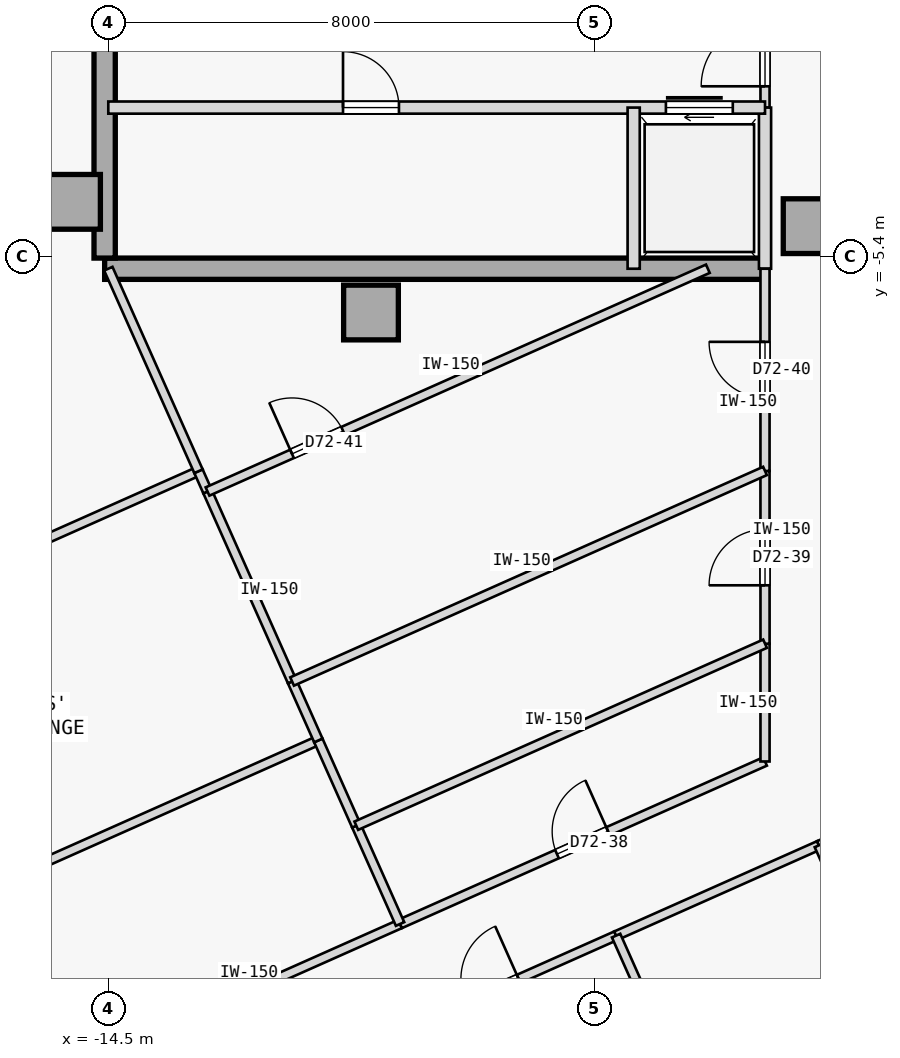
"""IFC4 building model, lengths in metres.
Left out: names, types, materials, properties, quantities, classifications, styles, units other than length and angle.
Written with IfcOpenShell. Run it as: python <this file> out.ifc"""

import sys

from ifc_helpers import new_model, si_unit, direction, frame, frame_2d, origin, origin_2d, place, context, subcontext, project, spatial, rectangle, extrude, element, fill, save


model = new_model("IFC4")
c1 = context("Model", 3, precision=1e-05, world=origin(), true_north=direction((0.0, 1.0)))
c2 = subcontext(c1, "Body", "Model", "MODEL_VIEW")
j1 = project(units=[si_unit("LENGTHUNIT", "METRE"), si_unit("PLANEANGLEUNIT", "RADIAN")], contexts=[c1])
p1 = place(None, origin())
s1 = spatial("IfcSite", under=j1, at=p1, CompositionType="ELEMENT")
p2 = place(p1, origin())
s2 = spatial("IfcBuilding", under=s1, at=p2, CompositionType="ELEMENT")
p3 = place(p2, frame((0.0, 0.0, 268.9)))
s3 = spatial("IfcBuildingStorey", under=s2, at=p3, CompositionType="ELEMENT", Elevation=268.9)
for number, where, z_axis, x_axis in (
    (1, (-15.08, -4.5, 0.0), (0.0, 0.0, 1.0), (1.0, 0.0, 0.0)),
    (2, (-10.18, -6.32, 0.0), (0.0, 0.0, 1.0), (1.0, 0.0, 0.0)),
    (3, (-2.95, -4.9, 0.0), (0.0, 0.0, 1.0), (1.0, 0.0, 0.0)),
):
    element("IfcColumn", number, at=place(p3, frame(where, z_axis=z_axis, x_axis=x_axis)), inside=s3, PredefinedType="COLUMN", context=c2, shape_type="SweptSolid", body=[
        extrude(rectangle(XDim=0.9, YDim=0.9, at=origin_2d()), origin(), (0.0, 0.0, 1.0), 3.35),
    ])
p4 = place(p3, frame((-14.56, -5.6, 0.0), z_axis=(0.0, 0.0, 1.0), x_axis=(1.0, 0.0, 0.0)))
e4 = element("IfcWall", 4, at=p4, inside=s3, PredefinedType="SHEAR", context=c2, shape_type="SweptSolid", body=[
    extrude(rectangle(XDim=10.86, YDim=0.35, at=frame_2d((5.43, 0.0))), origin(), (0.0, 0.0, 1.0), 3.125),
])
p5 = place(p3, frame((-14.56, -5.425, 0.0), z_axis=(0.0, 0.0, 1.0), x_axis=(0.0, 1.0, 0.0)))
e5 = element("IfcWall", 5, at=p5, inside=s3, PredefinedType="SHEAR", context=c2, shape_type="SweptSolid", body=[
    extrude(rectangle(XDim=10.85, YDim=0.35, at=frame_2d((5.425, 0.0))), origin(), (0.0, 0.0, 1.0), 3.125),
])
p6 = place(p3, frame((-3.7, -2.95, 0.0), z_axis=(0.0, 0.0, 1.0), x_axis=(0.0, 1.0, 0.0)))
e6 = element("IfcWall", 6, at=p6, inside=s3, PredefinedType="PARTITIONING", context=c2, shape_type="SweptSolid", body=[
    extrude(rectangle(XDim=1.8, YDim=0.15, at=frame_2d((0.9, 0.0))), origin(), (0.0, 0.0, 1.0), 3.125),
])
p7 = place(p6, frame((0.35, 0.0, 0.0)))
e7 = element("IfcOpeningElement", 7, at=p7, cuts=e6, PredefinedType="OPENING", context=c2, shape_type="SweptSolid", body=[
    extrude(rectangle(XDim=1.05, YDim=2.18, at=frame_2d((0.525, 1.09))), frame((0.0, 0.085, 0.0), z_axis=(0.0, -1.0, 0.0), x_axis=(1.0, 0.0, 0.0)), (0.0, 0.0, 1.0), 0.17),
])
p8 = place(p3, frame((-3.7, -5.6, 0.0), z_axis=(0.0, 0.0, 1.0), x_axis=(0.0, 1.0, 0.0)))
e8 = element("IfcWall", 8, at=p8, inside=s3, PredefinedType="STANDARD", context=c2, shape_type="SweptSolid", body=[
    extrude(rectangle(XDim=2.65, YDim=0.2, at=frame_2d((1.325, 0.0))), origin(), (0.0, 0.0, 1.0), 3.125),
])
p9 = place(p3, frame((-14.5, -2.95, 0.0), z_axis=(0.0, 0.0, 1.0), x_axis=(1.0, 0.0, 0.0)))
e9 = element("IfcWall", 9, at=p9, inside=s3, PredefinedType="STANDARD", context=c2, shape_type="SweptSolid", body=[
    extrude(rectangle(XDim=10.8, YDim=0.2, at=frame_2d((5.4, 0.0))), origin(), (0.0, 0.0, 1.0), 3.125),
])
p10 = place(p9, frame((9.17, 0.0, 0.0)))
e10 = element("IfcOpeningElement", 10, at=p10, cuts=e9, PredefinedType="OPENING", context=c2, shape_type="SweptSolid", body=[
    extrude(rectangle(XDim=1.1, YDim=2.15, at=frame_2d((0.55, 1.075))), frame((0.0, 0.11, 0.0), z_axis=(0.0, -1.0, 0.0), x_axis=(1.0, 0.0, 0.0)), (0.0, 0.0, 1.0), 0.22),
])
p11 = place(p9, frame((3.86, 0.0, 0.0)))
e11 = element("IfcOpeningElement", 11, at=p11, cuts=e9, PredefinedType="OPENING", context=c2, shape_type="SweptSolid", body=[
    extrude(rectangle(XDim=0.92, YDim=2.15, at=frame_2d((0.46, 1.075))), frame((0.0, 0.11, 0.0), z_axis=(0.0, -1.0, 0.0), x_axis=(1.0, 0.0, 0.0)), (0.0, 0.0, 1.0), 0.22),
])
p12 = place(p3, frame((-5.86, -5.6, 0.0), z_axis=(0.0, 0.0, 1.0), x_axis=(0.0, 1.0, 0.0)))
e12 = element("IfcWall", 12, at=p12, inside=s3, PredefinedType="STANDARD", context=c2, shape_type="SweptSolid", body=[
    extrude(rectangle(XDim=2.65, YDim=0.2, at=frame_2d((1.325, 0.0))), origin(), (0.0, 0.0, 1.0), 3.125),
])
p13 = place(p3, frame((-10.221, -18.38, 0.0), z_axis=(0.0, 0.0, 1.0), x_axis=(0.913542602601, 0.406743055543, 0.0)))
e13 = element("IfcWall", 13, at=p13, inside=s3, PredefinedType="PARTITIONING", context=c2, shape_type="SweptSolid", body=[
    extrude(rectangle(XDim=4.458, YDim=0.15, at=frame_2d((2.229, 0.0))), origin(), (0.0, 0.0, 1.0), 3.125),
])
p14 = place(p13, frame((1.754, 0.0, 0.0)))
e14 = element("IfcOpeningElement", 14, at=p14, cuts=e13, PredefinedType="OPENING", context=c2, shape_type="SweptSolid", body=[
    extrude(rectangle(XDim=0.95, YDim=2.15, at=frame_2d((0.475, 1.075))), frame((0.0, 0.085, 0.0), z_axis=(0.0, -1.0, 0.0), x_axis=(1.0, 0.0, 0.0)), (0.0, 0.0, 1.0), 0.17),
])
p15 = place(p3, frame((-6.149, -16.567, 0.0), z_axis=(0.0, 0.0, 1.0), x_axis=(0.913543802, 0.40674036169, 0.0)))
e15 = element("IfcWall", 15, at=p15, inside=s3, PredefinedType="PARTITIONING", context=c2, shape_type="SweptSolid", body=[
    extrude(rectangle(XDim=3.65, YDim=0.15, at=frame_2d((1.825, 0.0))), origin(), (0.0, 0.0, 1.0), 3.125),
])
p16 = place(p3, frame((-2.814, -15.082, 0.0), z_axis=(0.0, 0.0, 1.0), x_axis=(0.913558622212, 0.406707073682, 0.0)))
e16 = element("IfcWall", 16, at=p16, inside=s3, PredefinedType="PARTITIONING", context=c2, shape_type="SweptSolid", body=[
    extrude(rectangle(XDim=2.35, YDim=0.15, at=frame_2d((1.175, 0.0))), origin(), (0.0, 0.0, 1.0), 3.125),
])
p17 = place(p3, frame((-20.445, -21.159, 0.0), z_axis=(0.0, 0.0, 1.0), x_axis=(0.913547681516, 0.406731648137, 0.0)))
e17 = element("IfcWall", 17, at=p17, inside=s3, PredefinedType="PARTITIONING", context=c2, shape_type="SweptSolid", body=[
    extrude(rectangle(XDim=11.76, YDim=0.15, at=frame_2d((5.88, 0.0))), origin(), (0.0, 0.0, 1.0), 3.125),
])
p18 = place(p17, frame((5.42, 0.0, 0.0)))
e18 = element("IfcOpeningElement", 18, at=p18, cuts=e17, PredefinedType="OPENING", context=c2, shape_type="SweptSolid", body=[
    extrude(rectangle(XDim=0.92, YDim=2.15, at=frame_2d((0.46, 1.075))), frame((0.0, 0.085, 0.0), z_axis=(0.0, -1.0, 0.0), x_axis=(1.0, 0.0, 0.0)), (0.0, 0.0, 1.0), 0.17),
])
p19 = place(p3, frame((-9.702, -16.375, 0.0), z_axis=(0.0, 0.0, 1.0), x_axis=(0.913552389019, 0.406721074594, 0.0)))
e19 = element("IfcWall", 19, at=p19, inside=s3, PredefinedType="PARTITIONING", context=c2, shape_type="SweptSolid", body=[
    extrude(rectangle(XDim=6.57, YDim=0.15, at=frame_2d((3.285, 0.0))), origin(), (0.0, 0.0, 1.0), 3.125),
])
p20 = place(p19, frame((2.825, 0.0, 0.0)))
e20 = element("IfcOpeningElement", 20, at=p20, cuts=e19, PredefinedType="OPENING", context=c2, shape_type="SweptSolid", body=[
    extrude(rectangle(XDim=0.92, YDim=2.15, at=frame_2d((0.46, 1.075))), frame((0.0, 0.085, 0.0), z_axis=(0.0, -1.0, 0.0), x_axis=(1.0, 0.0, 0.0)), (0.0, 0.0, 1.0), 0.17),
])
p21 = place(p3, frame((-3.7, -13.703, 0.0), z_axis=(0.0, 0.0, 1.0), x_axis=(0.000126055716, 0.999999992055, 0.0)))
e21 = element("IfcWall", 21, at=p21, inside=s3, PredefinedType="PARTITIONING", context=c2, shape_type="SweptSolid", body=[
    extrude(rectangle(XDim=1.937, YDim=0.15, at=frame_2d((0.968, 0.0))), origin(), (0.0, 0.0, 1.0), 3.125),
])
p22 = place(p3, frame((-3.7, -11.767, 0.0), z_axis=(0.0, 0.0, 1.0), x_axis=(-0.000171850831, 0.999999985234, 0.0)))
e22 = element("IfcWall", 22, at=p22, inside=s3, PredefinedType="PARTITIONING", context=c2, shape_type="SweptSolid", body=[
    extrude(rectangle(XDim=2.841, YDim=0.15, at=frame_2d((1.421, 0.0))), origin(), (0.0, 0.0, 1.0), 3.125),
])
p23 = place(p22, frame((0.961, 0.0, 0.0)))
e23 = element("IfcOpeningElement", 23, at=p23, cuts=e22, PredefinedType="OPENING", context=c2, shape_type="SweptSolid", body=[
    extrude(rectangle(XDim=0.92, YDim=2.15, at=frame_2d((0.46, 1.075))), frame((0.0, 0.085, 0.0), z_axis=(0.0, -1.0, 0.0), x_axis=(1.0, 0.0, 0.0)), (0.0, 0.0, 1.0), 0.17),
])
p24 = place(p3, frame((-3.7, -8.925, 0.0), z_axis=(0.0, 0.0, 1.0), x_axis=(7.3410659e-05, 0.999999997305, 0.0)))
e24 = element("IfcWall", 24, at=p24, inside=s3, PredefinedType="PARTITIONING", context=c2, shape_type="SweptSolid", body=[
    extrude(rectangle(XDim=3.326, YDim=0.15, at=frame_2d((1.663, 0.0))), origin(), (0.0, 0.0, 1.0), 3.125),
])
p25 = place(p24, frame((1.203, 0.0, 0.0)))
e25 = element("IfcOpeningElement", 25, at=p25, cuts=e24, PredefinedType="OPENING", context=c2, shape_type="SweptSolid", body=[
    extrude(rectangle(XDim=0.92, YDim=2.15, at=frame_2d((0.46, 1.075))), frame((0.0, 0.085, 0.0), z_axis=(0.0, -1.0, 0.0), x_axis=(1.0, 0.0, 0.0)), (0.0, 0.0, 1.0), 0.17),
])
p26 = place(p3, frame((-2.271, -25.278, 0.0), z_axis=(0.0, 0.0, 1.0), x_axis=(-0.406751296215, 0.913538933504, 0.0)))
e26 = element("IfcWall", 26, at=p26, inside=s3, PredefinedType="PARTITIONING", context=c2, shape_type="SweptSolid", body=[
    extrude(rectangle(XDim=9.535, YDim=0.15, at=frame_2d((4.768, 0.0))), origin(), (0.0, 0.0, 1.0), 3.125),
])
p27 = place(p3, frame((-1.92, -17.092, 0.0), z_axis=(0.0, 0.0, 1.0), x_axis=(-0.406725294076, 0.913550510459, 0.0)))
e27 = element("IfcWall", 27, at=p27, inside=s3, PredefinedType="PARTITIONING", context=c2, shape_type="SweptSolid", body=[
    extrude(rectangle(XDim=2.2, YDim=0.15, at=frame_2d((1.1, 0.0))), origin(), (0.0, 0.0, 1.0), 3.125),
])
p28 = place(p3, frame((-21.789, -18.14, 0.0), z_axis=(0.0, 0.0, 1.0), x_axis=(0.913544247064, 0.406739362069, 0.0)))
e28 = element("IfcWall", 28, at=p28, inside=s3, PredefinedType="PARTITIONING", context=c2, shape_type="SweptSolid", body=[
    extrude(rectangle(XDim=11.76, YDim=0.15, at=frame_2d((5.88, 0.0))), origin(), (0.0, 0.0, 1.0), 3.125),
])
p29 = place(p3, frame((-9.702, -16.375, 0.0), z_axis=(0.0, 0.0, 1.0), x_axis=(-0.406740252054, 0.913543850813, 0.0)))
e29 = element("IfcWall", 29, at=p29, inside=s3, PredefinedType="PARTITIONING", context=c2, shape_type="SweptSolid", body=[
    extrude(rectangle(XDim=1.769, YDim=0.15, at=frame_2d((0.884, 0.0))), origin(), (0.0, 0.0, 1.0), 3.125),
])
p30 = place(p3, frame((-10.421, -14.76, 0.0), z_axis=(0.0, 0.0, 1.0), x_axis=(-0.406817131294, 0.91350961773, 0.0)))
e30 = element("IfcWall", 30, at=p30, inside=s3, PredefinedType="PARTITIONING", context=c2, shape_type="SweptSolid", body=[
    extrude(rectangle(XDim=1.535, YDim=0.15, at=frame_2d((0.768, 0.0))), origin(), (0.0, 0.0, 1.0), 3.125),
])
p31 = place(p3, frame((-21.942, -12.904, 0.0), z_axis=(0.0, 0.0, 1.0), x_axis=(0.913542396088, 0.40674351937, 0.0)))
e31 = element("IfcWall", 31, at=p31, inside=s3, PredefinedType="PARTITIONING", context=c2, shape_type="SweptSolid", body=[
    extrude(rectangle(XDim=9.77, YDim=0.15, at=frame_2d((4.885, 0.0))), origin(), (0.0, 0.0, 1.0), 3.125),
])
p32 = place(p3, frame((-11.046, -13.357, 0.0), z_axis=(0.0, 0.0, 1.0), x_axis=(-0.406629497236, 0.913593154515, 0.0)))
e32 = element("IfcWall", 32, at=p32, inside=s3, PredefinedType="PARTITIONING", context=c2, shape_type="SweptSolid", body=[
    extrude(rectangle(XDim=1.061, YDim=0.15, at=frame_2d((0.53, 0.0))), origin(), (0.0, 0.0, 1.0), 3.125),
])
p33 = place(p3, frame((-11.477, -12.388, 0.0), z_axis=(0.0, 0.0, 1.0), x_axis=(-0.406760980894, 0.913534621359, 0.0)))
e33 = element("IfcWall", 33, at=p33, inside=s3, PredefinedType="PARTITIONING", context=c2, shape_type="SweptSolid", body=[
    extrude(rectangle(XDim=3.42, YDim=0.15, at=frame_2d((1.71, 0.0))), origin(), (0.0, 0.0, 1.0), 3.125),
])
p34 = place(p3, frame((-12.868, -9.264, 0.0), z_axis=(0.0, 0.0, 1.0), x_axis=(-0.406634840409, 0.913590776314, 0.0)))
e34 = element("IfcWall", 34, at=p34, inside=s3, PredefinedType="PARTITIONING", context=c2, shape_type="SweptSolid", body=[
    extrude(rectangle(XDim=0.365, YDim=0.15, at=frame_2d((0.183, 0.0))), origin(), (0.0, 0.0, 1.0), 3.125),
])
p35 = place(p3, frame((-13.017, -8.93, 0.0), z_axis=(0.0, 0.0, 1.0), x_axis=(-0.406722395322, 0.913551801018, 0.0)))
e35 = element("IfcWall", 35, at=p35, inside=s3, PredefinedType="PARTITIONING", context=c2, shape_type="SweptSolid", body=[
    extrude(rectangle(XDim=3.646, YDim=0.15, at=frame_2d((1.823, 0.0))), origin(), (0.0, 0.0, 1.0), 3.125),
])
p36 = place(p3, frame((-10.421, -14.76, 0.0), z_axis=(0.0, 0.0, 1.0), x_axis=(0.913533574053, 0.406763333006, 0.0)))
e36 = element("IfcWall", 36, at=p36, inside=s3, PredefinedType="PARTITIONING", context=c2, shape_type="SweptSolid", body=[
    extrude(rectangle(XDim=7.358, YDim=0.15, at=frame_2d((3.679, 0.0))), origin(), (0.0, 0.0, 1.0), 3.125),
])
p37 = place(p3, frame((-11.477, -12.388, 0.0), z_axis=(0.0, 0.0, 1.0), x_axis=(0.913542897736, 0.406742392673, 0.0)))
e37 = element("IfcWall", 37, at=p37, inside=s3, PredefinedType="PARTITIONING", context=c2, shape_type="SweptSolid", body=[
    extrude(rectangle(XDim=8.513, YDim=0.15, at=frame_2d((4.257, 0.0))), origin(), (0.0, 0.0, 1.0), 3.125),
])
p38 = place(p3, frame((-12.868, -9.264, 0.0), z_axis=(0.0, 0.0, 1.0), x_axis=(0.913545332854, 0.406736923356, 0.0)))
e38 = element("IfcWall", 38, at=p38, inside=s3, PredefinedType="PARTITIONING", context=c2, shape_type="SweptSolid", body=[
    extrude(rectangle(XDim=9.007, YDim=0.15, at=frame_2d((4.504, 0.0))), origin(), (0.0, 0.0, 1.0), 3.125),
])
p39 = place(p38, frame((1.521, 0.0, 0.0)))
e39 = element("IfcOpeningElement", 39, at=p39, cuts=e38, PredefinedType="OPENING", context=c2, shape_type="SweptSolid", body=[
    extrude(rectangle(XDim=0.92, YDim=2.15, at=frame_2d((0.46, 1.075))), frame((0.0, 0.085, 0.0), z_axis=(0.0, -1.0, 0.0), x_axis=(1.0, 0.0, 0.0)), (0.0, 0.0, 1.0), 0.17),
])
p40 = place(p7, origin())
e40 = element("IfcDoor", 40, at=p40, inside=s3, OperationType="SINGLE_SWING_LEFT", PredefinedType="DOOR", context=c2, shape_type="SweptSolid", body=[
    extrude(rectangle(XDim=1.05, YDim=2.18, at=frame_2d((0.525, 1.09))), frame((0.0, 0.025, 0.0), z_axis=(0.0, -1.0, 0.0), x_axis=(1.0, 0.0, 0.0)), (0.0, 0.0, 1.0), 0.05),
])
fill(e7, e40)
p41 = place(p10, origin())
e41 = element("IfcDoor", 41, at=p41, inside=s3, OperationType="SLIDING_TO_RIGHT", PredefinedType="DOOR", context=c2, shape_type="SweptSolid", body=[
    extrude(rectangle(XDim=1.1, YDim=2.15, at=frame_2d((0.55, 1.075))), frame((0.0, 0.025, 0.0), z_axis=(0.0, -1.0, 0.0), x_axis=(1.0, 0.0, 0.0)), (0.0, 0.0, 1.0), 0.05),
])
fill(e10, e41)
p42 = place(p11, origin())
e42 = element("IfcDoor", 42, at=p42, inside=s3, OperationType="SINGLE_SWING_LEFT", PredefinedType="DOOR", context=c2, shape_type="SweptSolid", body=[
    extrude(rectangle(XDim=0.92, YDim=2.15, at=frame_2d((0.46, 1.075))), frame((0.0, 0.025, 0.0), z_axis=(0.0, -1.0, 0.0), x_axis=(1.0, 0.0, 0.0)), (0.0, 0.0, 1.0), 0.05),
])
fill(e11, e42)
p43 = place(p14, origin())
e43 = element("IfcDoor", 43, at=p43, inside=s3, OperationType="SINGLE_SWING_RIGHT", PredefinedType="DOOR", context=c2, shape_type="SweptSolid", body=[
    extrude(rectangle(XDim=0.95, YDim=2.15, at=frame_2d((0.475, 1.075))), frame((0.0, 0.025, 0.0), z_axis=(0.0, -1.0, 0.0), x_axis=(1.0, 0.0, 0.0)), (0.0, 0.0, 1.0), 0.05),
])
fill(e14, e43)
p44 = place(p20, origin())
e44 = element("IfcDoor", 44, at=p44, inside=s3, OperationType="SINGLE_SWING_RIGHT", PredefinedType="DOOR", context=c2, shape_type="SweptSolid", body=[
    extrude(rectangle(XDim=0.92, YDim=2.15, at=frame_2d((0.46, 1.075))), frame((0.0, 0.025, 0.0), z_axis=(0.0, -1.0, 0.0), x_axis=(1.0, 0.0, 0.0)), (0.0, 0.0, 1.0), 0.05),
])
fill(e20, e44)
p45 = place(p23, origin())
e45 = element("IfcDoor", 45, at=p45, inside=s3, OperationType="SINGLE_SWING_LEFT", PredefinedType="DOOR", context=c2, shape_type="SweptSolid", body=[
    extrude(rectangle(XDim=0.92, YDim=2.15, at=frame_2d((0.46, 1.075))), frame((0.0, 0.025, 0.0), z_axis=(0.0, -1.0, 0.0), x_axis=(1.0, 0.0, 0.0)), (0.0, 0.0, 1.0), 0.05),
])
fill(e23, e45)
p46 = place(p25, origin())
e46 = element("IfcDoor", 46, at=p46, inside=s3, OperationType="SINGLE_SWING_RIGHT", PredefinedType="DOOR", context=c2, shape_type="SweptSolid", body=[
    extrude(rectangle(XDim=0.92, YDim=2.15, at=frame_2d((0.46, 1.075))), frame((0.0, 0.025, 0.0), z_axis=(0.0, -1.0, 0.0), x_axis=(1.0, 0.0, 0.0)), (0.0, 0.0, 1.0), 0.05),
])
fill(e25, e46)
p47 = place(p39, origin())
e47 = element("IfcDoor", 47, at=p47, inside=s3, OperationType="SINGLE_SWING_LEFT", PredefinedType="DOOR", context=c2, shape_type="SweptSolid", body=[
    extrude(rectangle(XDim=0.92, YDim=2.15, at=frame_2d((0.46, 1.075))), frame((0.0, 0.025, 0.0), z_axis=(0.0, -1.0, 0.0), x_axis=(1.0, 0.0, 0.0)), (0.0, 0.0, 1.0), 0.05),
])
fill(e39, e47)
save(model, sys.argv[1])
